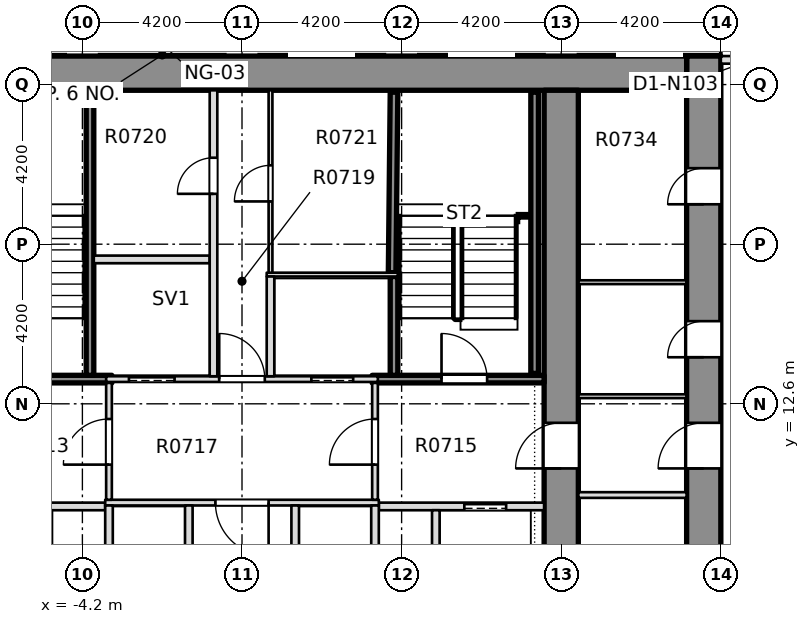
"""IFC4 building model, lengths in metres.
Left out: names, types, materials, properties, quantities, classifications, styles, units other than length and angle.
Written with IfcOpenShell. Run it as: python <this file> out.ifc"""

import sys

from ifc_helpers import new_model, si_unit, direction, frame, frame_2d, origin, place, context, subcontext, project, spatial, rectangle, extrude, element, fill, save


model = new_model("IFC4")
c1 = context("Model", 3, precision=1e-05, world=origin(), true_north=direction((0.0, 1.0)))
c2 = subcontext(c1, "Body", "Model", "MODEL_VIEW")
j1 = project(units=[si_unit("LENGTHUNIT", "METRE"), si_unit("PLANEANGLEUNIT", "RADIAN")], contexts=[c1])
p1 = place(None, origin())
s1 = spatial("IfcSite", under=j1, at=p1, CompositionType="ELEMENT")
p2 = place(p1, origin())
s2 = spatial("IfcBuilding", under=s1, at=p2, CompositionType="ELEMENT")
p3 = place(p2, frame((0.0, 0.0, 37.95)))
s3 = spatial("IfcBuildingStorey", under=s2, at=p3, CompositionType="ELEMENT", Elevation=37.95)
p4 = place(p3, frame((12.15, -8.4, -0.32), z_axis=(0.0, 0.0, 1.0), x_axis=(0.0, 1.0, 0.0)))
e1 = element("IfcWall", 1, at=p4, inside=s3, PredefinedType="SHEAR", context=c2, shape_type="SweptSolid", body=[
    extrude(rectangle(XDim=30.15, YDim=0.9, at=frame_2d((15.075, 0.0))), origin(), (0.0, 0.0, 1.0), 3.45),
])
p5 = place(p4, frame((3.925, 0.0, 0.32)))
e2 = element("IfcOpeningElement", 2, at=p5, cuts=e1, PredefinedType="OPENING", context=c2, shape_type="SweptSolid", body=[
    extrude(rectangle(XDim=0.95, YDim=2.1, at=frame_2d((0.475, 1.05))), frame((0.0, 0.46, 0.0), z_axis=(0.0, -1.0, 0.0), x_axis=(1.0, 0.0, 0.0)), (0.0, 0.0, 1.0), 0.92),
])
p6 = place(p4, frame((9.175, 0.0, 0.32)))
e3 = element("IfcOpeningElement", 3, at=p6, cuts=e1, PredefinedType="OPENING", context=c2, shape_type="SweptSolid", body=[
    extrude(rectangle(XDim=0.95, YDim=2.1, at=frame_2d((0.475, 1.05))), frame((0.0, 0.46, 0.0), z_axis=(0.0, -1.0, 0.0), x_axis=(1.0, 0.0, 0.0)), (0.0, 0.0, 1.0), 0.92),
])
p7 = place(p4, frame((14.525, 0.0, 0.32)))
e4 = element("IfcOpeningElement", 4, at=p7, cuts=e1, PredefinedType="OPENING", context=c2, shape_type="SweptSolid", body=[
    extrude(rectangle(XDim=0.95, YDim=2.1, at=frame_2d((0.475, 1.05))), frame((0.0, 0.46, 0.0), z_axis=(0.0, -1.0, 0.0), x_axis=(1.0, 0.0, 0.0)), (0.0, 0.0, 1.0), 0.92),
])
p8 = place(p4, frame((22.225, 0.0, 0.32)))
e5 = element("IfcOpeningElement", 5, at=p8, cuts=e1, PredefinedType="OPENING", context=c2, shape_type="SweptSolid", body=[
    extrude(rectangle(XDim=0.95, YDim=2.1, at=frame_2d((0.475, 1.05))), frame((0.0, 0.46, 0.0), z_axis=(0.0, -1.0, 0.0), x_axis=(1.0, 0.0, 0.0)), (0.0, 0.0, 1.0), 0.92),
])
p9 = place(p4, frame((26.25, 0.0, 0.32)))
e6 = element("IfcOpeningElement", 6, at=p9, cuts=e1, PredefinedType="OPENING", context=c2, shape_type="SweptSolid", body=[
    extrude(rectangle(XDim=0.95, YDim=2.1, at=frame_2d((0.475, 1.05))), frame((0.0, 0.46, 0.0), z_axis=(0.0, -1.0, 0.0), x_axis=(1.0, 0.0, 0.0)), (0.0, 0.0, 1.0), 0.92),
])
p10 = place(p4, frame((19.3, 0.0, 0.32)))
e7 = element("IfcOpeningElement", 7, at=p10, cuts=e1, PredefinedType="OPENING", context=c2, shape_type="SweptSolid", body=[
    extrude(rectangle(XDim=1.2, YDim=2.1, at=frame_2d((0.6, 1.05))), frame((0.0, 0.46, 0.0), z_axis=(0.0, -1.0, 0.0), x_axis=(1.0, 0.0, 0.0)), (0.0, 0.0, 1.0), 0.92),
])
p11 = place(p3, frame((-11.7, 21.3, -0.32), z_axis=(0.0, 0.0, 1.0), x_axis=(1.0, 0.0, 0.0)))
e8 = element("IfcWall", 8, at=p11, inside=s3, PredefinedType="SOLIDWALL", context=c2, shape_type="SweptSolid", body=[
    extrude(rectangle(XDim=23.4, YDim=0.9, at=frame_2d((11.7, 0.0))), origin(), (0.0, 0.0, 1.0), 3.45),
])
p12 = place(p3, frame((8.4, -7.5, -0.32), z_axis=(0.0, 0.0, 1.0), x_axis=(0.0, 1.0, 0.0)))
e9 = element("IfcWall", 9, at=p12, inside=s3, PredefinedType="SHEAR", context=c2, shape_type="SweptSolid", body=[
    extrude(rectangle(XDim=28.35, YDim=0.9, at=frame_2d((14.175, 0.0))), origin(), (0.0, 0.0, 1.0), 3.45),
])
p13 = place(p12, frame((18.4, 0.0, 0.32)))
e10 = element("IfcOpeningElement", 10, at=p13, cuts=e9, PredefinedType="OPENING", context=c2, shape_type="SweptSolid", body=[
    extrude(rectangle(XDim=1.2, YDim=2.1, at=frame_2d((0.6, 1.05))), frame((0.0, 0.46, 0.0), z_axis=(0.0, -1.0, 0.0), x_axis=(1.0, 0.0, 0.0)), (0.0, 0.0, 1.0), 0.92),
])
p14 = place(p3, frame((16.1, 21.65, 0.0), z_axis=(0.0, 0.0, 1.0), x_axis=(-1.0, 0.0, 0.0)))
e11 = element("IfcWall", 11, at=p14, inside=s3, PredefinedType="STANDARD", context=c2, shape_type="SweptSolid", body=[
    extrude(rectangle(XDim=3.5, YDim=0.2, at=frame_2d((1.75, 0.0))), origin(), (0.0, 0.0, 1.0), 3.13),
])
p15 = place(p14, frame((2.2, 0.0, 0.0)))
e12 = element("IfcOpeningElement", 12, at=p15, cuts=e11, PredefinedType="OPENING", context=c2, shape_type="SweptSolid", body=[
    extrude(rectangle(XDim=1.0, YDim=2.4, at=frame_2d((0.5, 1.2))), frame((0.0, 0.11, 0.0), z_axis=(0.0, -1.0, 0.0), x_axis=(1.0, 0.0, 0.0)), (0.0, 0.0, 1.0), 0.22),
])
p16 = place(p3, frame((-7.949, 9.9, 0.0), z_axis=(0.0, 0.0, 1.0), x_axis=(1.0, 0.0, 0.0)))
e13 = element("IfcWall", 13, at=p16, inside=s3, PredefinedType="PARTITIONING", context=c2, shape_type="SweptSolid", body=[
    extrude(rectangle(XDim=4.349, YDim=0.2, at=frame_2d((2.174, 0.0))), origin(), (0.0, 0.0, 1.0), 3.13),
])
p17 = place(p16, frame((0.999, 0.0, 0.0)))
e14 = element("IfcOpeningElement", 14, at=p17, cuts=e13, PredefinedType="OPENING", context=c2, shape_type="SweptSolid", body=[
    extrude(rectangle(XDim=1.1, YDim=2.1, at=frame_2d((0.55, 1.05))), frame((0.0, 0.11, 0.0), z_axis=(0.0, -1.0, 0.0), x_axis=(1.0, 0.0, 0.0)), (0.0, 0.0, 1.0), 0.22),
])
p18 = place(p3, frame((3.6, 9.9, 0.0), z_axis=(0.0, 0.0, 1.0), x_axis=(1.0, 0.0, 0.0)))
e15 = element("IfcWall", 15, at=p18, inside=s3, PredefinedType="PARTITIONING", context=c2, shape_type="SweptSolid", body=[
    extrude(rectangle(XDim=4.349, YDim=0.2, at=frame_2d((2.174, 0.0))), origin(), (0.0, 0.0, 1.0), 3.13),
])
p19 = place(p18, frame((2.25, 0.0, 0.0)))
e16 = element("IfcOpeningElement", 16, at=p19, cuts=e15, PredefinedType="OPENING", context=c2, shape_type="SweptSolid", body=[
    extrude(rectangle(XDim=1.1, YDim=2.1, at=frame_2d((0.55, 1.05))), frame((0.0, 0.11, 0.0), z_axis=(0.0, -1.0, 0.0), x_axis=(1.0, 0.0, 0.0)), (0.0, 0.0, 1.0), 0.22),
])
p20 = place(p3, frame((-3.6, 10.0, 0.0), z_axis=(0.0, 0.0, 1.0), x_axis=(1.0, 0.0, 0.0)))
e17 = element("IfcWall", 17, at=p20, inside=s3, PredefinedType="PARTITIONING", context=c2, shape_type="SweptSolid", body=[
    extrude(rectangle(XDim=7.2, YDim=0.15, at=frame_2d((3.6, 0.0))), origin(), (0.0, 0.0, 1.0), 3.13),
])
p21 = place(p20, frame((2.9, 0.0, 0.0)))
e18 = element("IfcOpeningElement", 18, at=p21, cuts=e17, PredefinedType="OPENING", context=c2, shape_type="SweptSolid", body=[
    extrude(rectangle(XDim=1.4, YDim=2.1, at=frame_2d((0.7, 1.05))), frame((0.0, 0.085, 0.0), z_axis=(0.0, -1.0, 0.0), x_axis=(1.0, 0.0, 0.0)), (0.0, 0.0, 1.0), 0.17),
])
p22 = place(p3, frame((-7.949, 13.25, 0.0), z_axis=(0.0, 0.0, 1.0), x_axis=(1.0, 0.0, 0.0)))
e19 = element("IfcWall", 19, at=p22, inside=s3, PredefinedType="SOLIDWALL", context=c2, shape_type="SweptSolid", body=[
    extrude(rectangle(XDim=4.524, YDim=0.2, at=frame_2d((2.262, 0.0))), origin(), (0.0, 0.0, 1.0), 3.13),
])
p23 = place(p22, frame((1.499, 0.0, 0.0)))
e20 = element("IfcOpeningElement", 20, at=p23, cuts=e19, PredefinedType="OPENING", context=c2, shape_type="SweptSolid", body=[
    extrude(rectangle(XDim=1.2, YDim=2.1, at=frame_2d((0.6, 1.05))), frame((0.0, 0.11, 0.0), z_axis=(0.0, -1.0, 0.0), x_axis=(1.0, 0.0, 0.0)), (0.0, 0.0, 1.0), 0.22),
])
p24 = place(p3, frame((-3.575, 13.25, 0.0), z_axis=(0.0, 0.0, 1.0), x_axis=(1.0, 0.0, 0.0)))
e21 = element("IfcWall", 21, at=p24, inside=s3, PredefinedType="PARTITIONING", context=c2, shape_type="SweptSolid", body=[
    extrude(rectangle(XDim=7.15, YDim=0.15, at=frame_2d((3.575, 0.0))), origin(), (0.0, 0.0, 1.0), 3.13),
])
p25 = place(p24, frame((0.6, 0.0, 0.0)))
e22 = element("IfcOpeningElement", 22, at=p25, cuts=e21, PredefinedType="OPENING", context=c2, shape_type="SweptSolid", body=[
    extrude(rectangle(XDim=1.2, YDim=2.1, at=frame_2d((0.6, 1.05))), frame((0.0, 0.085, 0.0), z_axis=(0.0, -1.0, 0.0), x_axis=(1.0, 0.0, 0.0)), (0.0, 0.0, 1.0), 0.17),
])
p26 = place(p24, frame((5.4, 0.0, 0.0)))
e23 = element("IfcOpeningElement", 23, at=p26, cuts=e21, PredefinedType="OPENING", context=c2, shape_type="SweptSolid", body=[
    extrude(rectangle(XDim=1.1, YDim=2.1, at=frame_2d((0.55, 1.05))), frame((0.0, 0.085, 0.0), z_axis=(0.0, -1.0, 0.0), x_axis=(1.0, 0.0, 0.0)), (0.0, 0.0, 1.0), 0.17),
])
p27 = place(p24, frame((2.975, 0.0, 0.0)))
e24 = element("IfcOpeningElement", 24, at=p27, cuts=e21, PredefinedType="OPENING", context=c2, shape_type="SweptSolid", body=[
    extrude(rectangle(XDim=1.2, YDim=2.1, at=frame_2d((0.6, 1.05))), frame((0.0, 0.085, 0.0), z_axis=(0.0, -1.0, 0.0), x_axis=(1.0, 0.0, 0.0)), (0.0, 0.0, 1.0), 0.17),
])
p28 = place(p3, frame((3.425, 13.25, 0.0), z_axis=(0.0, 0.0, 1.0), x_axis=(1.0, 0.0, 0.0)))
e25 = element("IfcWall", 25, at=p28, inside=s3, PredefinedType="SOLIDWALL", context=c2, shape_type="SweptSolid", body=[
    extrude(rectangle(XDim=4.524, YDim=0.2, at=frame_2d((2.262, 0.0))), origin(), (0.0, 0.0, 1.0), 3.13),
])
p29 = place(p28, frame((1.825, 0.0, 0.0)))
e26 = element("IfcOpeningElement", 26, at=p29, cuts=e25, PredefinedType="OPENING", context=c2, shape_type="SweptSolid", body=[
    extrude(rectangle(XDim=1.2, YDim=2.1, at=frame_2d((0.6, 1.05))), frame((0.0, 0.11, 0.0), z_axis=(0.0, -1.0, 0.0), x_axis=(1.0, 0.0, 0.0)), (0.0, 0.0, 1.0), 0.22),
])
p30 = place(p3, frame((0.65, 16.0, 0.0), z_axis=(0.0, 0.0, 1.0), x_axis=(1.0, 0.0, 0.0)))
e27 = element("IfcWall", 27, at=p30, inside=s3, PredefinedType="PARTITIONING", context=c2, shape_type="SweptSolid", body=[
    extrude(rectangle(XDim=3.45, YDim=0.1, at=frame_2d((1.725, 0.0))), origin(), (0.0, 0.0, 1.0), 3.13),
])
p31 = place(p3, frame((-3.9, 16.4, 0.0), z_axis=(0.0, 0.0, 1.0), x_axis=(1.0, 0.0, 0.0)))
e28 = element("IfcWall", 28, at=p31, inside=s3, PredefinedType="PARTITIONING", context=c2, shape_type="SweptSolid", body=[
    extrude(rectangle(XDim=3.05, YDim=0.2, at=frame_2d((1.525, 0.0))), origin(), (0.0, 0.0, 1.0), 3.13),
])
p32 = place(p3, frame((-4.0, 13.35, 0.0), z_axis=(0.0, 0.0, 1.0), x_axis=(0.0, 1.0, 0.0)))
e29 = element("IfcWall", 29, at=p32, inside=s3, PredefinedType="SOLIDWALL", context=c2, shape_type="SweptSolid", body=[
    extrude(rectangle(XDim=7.499, YDim=0.2, at=frame_2d((3.75, 0.0))), origin(), (0.0, 0.0, 1.0), 3.13),
])
p33 = place(p3, frame((-3.5, 7.075, 0.0), z_axis=(0.0, 0.0, 1.0), x_axis=(0.0, 1.0, 0.0)))
e30 = element("IfcWall", 30, at=p33, inside=s3, PredefinedType="PARTITIONING", context=c2, shape_type="SweptSolid", body=[
    extrude(rectangle(XDim=2.85, YDim=0.2, at=frame_2d((1.425, 0.0))), origin(), (0.0, 0.0, 1.0), 3.13),
])
p34 = place(p3, frame((-3.5, 10.075, 0.0), z_axis=(0.0, 0.0, 1.0), x_axis=(0.0, 1.0, 0.0)))
e31 = element("IfcWall", 31, at=p34, inside=s3, PredefinedType="PARTITIONING", context=c2, shape_type="SweptSolid", body=[
    extrude(rectangle(XDim=3.075, YDim=0.15, at=frame_2d((1.538, 0.0))), origin(), (0.0, 0.0, 1.0), 3.13),
])
p35 = place(p34, frame((0.925, 0.0, 0.0)))
e32 = element("IfcOpeningElement", 32, at=p35, cuts=e31, PredefinedType="OPENING", context=c2, shape_type="SweptSolid", body=[
    extrude(rectangle(XDim=1.2, YDim=2.1, at=frame_2d((0.6, 1.05))), frame((0.0, 0.085, 0.0), z_axis=(0.0, -1.0, 0.0), x_axis=(1.0, 0.0, 0.0)), (0.0, 0.0, 1.0), 0.17),
])
p36 = place(p3, frame((-1.4, 7.075, 0.0), z_axis=(0.0, 0.0, 1.0), x_axis=(0.0, 1.0, 0.0)))
e33 = element("IfcWall", 33, at=p36, inside=s3, PredefinedType="PARTITIONING", context=c2, shape_type="SweptSolid", body=[
    extrude(rectangle(XDim=2.85, YDim=0.2, at=frame_2d((1.425, 0.0))), origin(), (0.0, 0.0, 1.0), 3.13),
])
p37 = place(p3, frame((-0.75, 13.325, 0.0), z_axis=(0.0, 0.0, 1.0), x_axis=(0.0, 1.0, 0.0)))
e34 = element("IfcWall", 34, at=p37, inside=s3, PredefinedType="PARTITIONING", context=c2, shape_type="SweptSolid", body=[
    extrude(rectangle(XDim=7.524, YDim=0.2, at=frame_2d((3.762, 0.0))), origin(), (0.0, 0.0, 1.0), 3.13),
])
p38 = place(p37, frame((4.8, 0.0, 0.0)))
e35 = element("IfcOpeningElement", 35, at=p38, cuts=e34, PredefinedType="OPENING", context=c2, shape_type="SweptSolid", body=[
    extrude(rectangle(XDim=0.95, YDim=2.1, at=frame_2d((0.475, 1.05))), frame((0.0, 0.11, 0.0), z_axis=(0.0, -1.0, 0.0), x_axis=(1.0, 0.0, 0.0)), (0.0, 0.0, 1.0), 0.22),
])
p39 = place(p3, frame((0.75, 13.325, 0.0), z_axis=(0.0, 0.0, 1.0), x_axis=(0.0, 1.0, 0.0)))
e36 = element("IfcWall", 36, at=p39, inside=s3, PredefinedType="PARTITIONING", context=c2, shape_type="SweptSolid", body=[
    extrude(rectangle(XDim=2.625, YDim=0.2, at=frame_2d((1.312, 0.0))), origin(), (0.0, 0.0, 1.0), 3.13),
])
p40 = place(p3, frame((0.75, 16.05, 0.0), z_axis=(0.0, 0.0, 1.0), x_axis=(0.0, 1.0, 0.0)))
e37 = element("IfcWall", 37, at=p40, inside=s3, PredefinedType="PARTITIONING", context=c2, shape_type="SweptSolid", body=[
    extrude(rectangle(XDim=4.799, YDim=0.1, at=frame_2d((2.399, 0.0))), origin(), (0.0, 0.0, 1.0), 3.13),
])
p41 = place(p40, frame((1.875, 0.0, 0.0)))
e38 = element("IfcOpeningElement", 38, at=p41, cuts=e37, PredefinedType="OPENING", context=c2, shape_type="SweptSolid", body=[
    extrude(rectangle(XDim=0.95, YDim=2.1, at=frame_2d((0.475, 1.05))), frame((0.0, 0.06, 0.0), z_axis=(0.0, -1.0, 0.0), x_axis=(1.0, 0.0, 0.0)), (0.0, 0.0, 1.0), 0.12),
])
for number, where, z_axis, x_axis in (
    (39, (1.4, 7.075, 0.0), (0.0, 0.0, 1.0), (0.0, 1.0, 0.0)),
    (40, (3.5, 7.075, 0.0), (0.0, 0.0, 1.0), (0.0, 1.0, 0.0)),
):
    element("IfcWall", number, at=place(p3, frame(where, z_axis=z_axis, x_axis=x_axis)), inside=s3, PredefinedType="PARTITIONING", context=c2, shape_type="SweptSolid", body=[
        extrude(rectangle(XDim=2.85, YDim=0.2, at=frame_2d((1.425, 0.0))), origin(), (0.0, 0.0, 1.0), 3.13),
    ])
p42 = place(p3, frame((3.5, 10.075, 0.0), z_axis=(0.0, 0.0, 1.0), x_axis=(0.0, 1.0, 0.0)))
e41 = element("IfcWall", 41, at=p42, inside=s3, PredefinedType="PARTITIONING", context=c2, shape_type="SweptSolid", body=[
    extrude(rectangle(XDim=3.075, YDim=0.15, at=frame_2d((1.538, 0.0))), origin(), (0.0, 0.0, 1.0), 3.13),
])
p43 = place(p42, frame((0.925, 0.0, 0.0)))
e42 = element("IfcOpeningElement", 42, at=p43, cuts=e41, PredefinedType="OPENING", context=c2, shape_type="SweptSolid", body=[
    extrude(rectangle(XDim=1.2, YDim=2.1, at=frame_2d((0.6, 1.05))), frame((0.0, 0.085, 0.0), z_axis=(0.0, -1.0, 0.0), x_axis=(1.0, 0.0, 0.0)), (0.0, 0.0, 1.0), 0.17),
])
p44 = place(p3, frame((4.0, 13.35, 0.0), z_axis=(0.0, 0.0, 1.0), x_axis=(0.0, 1.0, 0.0)))
e43 = element("IfcWall", 43, at=p44, inside=s3, PredefinedType="SOLIDWALL", context=c2, shape_type="SweptSolid", body=[
    extrude(rectangle(XDim=2.6, YDim=0.2, at=frame_2d((1.3, 0.0))), origin(), (0.0, 0.0, 1.0), 3.13),
])
p45 = place(p3, frame((3.95, 16.05, 0.0), z_axis=(0.0, 0.0, 1.0), x_axis=(0.010538176883, 0.999944471872, 0.0)))
e44 = element("IfcWall", 44, at=p45, inside=s3, PredefinedType="SOLIDWALL", context=c2, shape_type="SweptSolid", body=[
    extrude(rectangle(XDim=4.749, YDim=0.2, at=frame_2d((2.375, 0.0))), origin(), (0.0, 0.0, 1.0), 3.13),
])
p46 = place(p3, frame((5.1, 7.075, 0.0), z_axis=(0.0, 0.0, 1.0), x_axis=(0.0, 1.0, 0.0)))
e45 = element("IfcWall", 45, at=p46, inside=s3, PredefinedType="PARTITIONING", context=c2, shape_type="SweptSolid", body=[
    extrude(rectangle(XDim=2.725, YDim=0.2, at=frame_2d((1.363, 0.0))), origin(), (0.0, 0.0, 1.0), 3.13),
])
p47 = place(p3, frame((8.851, 10.2, 0.0), z_axis=(0.0, 0.0, 1.0), x_axis=(1.0, 0.0, 0.0)))
e46 = element("IfcWall", 46, at=p47, inside=s3, PredefinedType="PARTITIONING", context=c2, shape_type="SweptSolid", body=[
    extrude(rectangle(XDim=2.848, YDim=0.15, at=frame_2d((1.424, 0.0))), origin(), (0.0, 0.0, 1.0), 3.13),
])
for number, where, z_axis, x_axis in (
    (47, (8.851, 12.8, 0.0), (0.0, 0.0, 1.0), (1.0, 0.0, 0.0)),
    (48, (8.851, 15.8, 0.0), (0.0, 0.0, 1.0), (1.0, 0.0, 0.0)),
):
    element("IfcWall", number, at=place(p3, frame(where, z_axis=z_axis, x_axis=x_axis)), inside=s3, PredefinedType="PARTITIONING", context=c2, shape_type="SweptSolid", body=[
        extrude(rectangle(XDim=2.848, YDim=0.1, at=frame_2d((1.424, 0.0))), origin(), (0.0, 0.0, 1.0), 3.13),
    ])
p48 = place(p3, frame((7.7, 13.4, 0.0), z_axis=(0.0, 0.0, 1.0), x_axis=(0.0, 1.0, 0.0)))
e49 = element("IfcWall", 49, at=p48, inside=s3, PredefinedType="SOLIDWALL", context=c2, shape_type="SweptSolid", body=[
    extrude(rectangle(XDim=7.4, YDim=0.2, at=frame_2d((3.7, 0.0))), origin(), (0.0, 0.0, 1.0), 3.13),
])
p49 = place(p29, origin())
e50 = element("IfcDoor", 50, at=p49, inside=s3, OperationType="SINGLE_SWING_RIGHT", PredefinedType="DOOR", context=c2, shape_type="SweptSolid", body=[
    extrude(rectangle(XDim=1.2, YDim=2.1, at=frame_2d((0.6, 1.05))), frame((0.0, 0.025, 0.0), z_axis=(0.0, -1.0, 0.0), x_axis=(1.0, 0.0, 0.0)), (0.0, 0.0, 1.0), 0.05),
])
fill(e26, e50)
p50 = place(p19, origin())
e51 = element("IfcDoor", 51, at=p50, inside=s3, OperationType="SLIDING_TO_LEFT", PredefinedType="DOOR", context=c2, shape_type="SweptSolid", body=[
    extrude(rectangle(XDim=1.1, YDim=2.1, at=frame_2d((0.55, 1.05))), frame((0.0, 0.025, 0.0), z_axis=(0.0, -1.0, 0.0), x_axis=(1.0, 0.0, 0.0)), (0.0, 0.0, 1.0), 0.05),
])
fill(e16, e51)
p51 = place(p21, origin())
e52 = element("IfcDoor", 52, at=p51, inside=s3, OperationType="SINGLE_SWING_RIGHT", PredefinedType="DOOR", context=c2, shape_type="SweptSolid", body=[
    extrude(rectangle(XDim=1.4, YDim=2.1, at=frame_2d((0.7, 1.05))), frame((0.0, 0.025, 0.0), z_axis=(0.0, -1.0, 0.0), x_axis=(1.0, 0.0, 0.0)), (0.0, 0.0, 1.0), 0.05),
])
fill(e18, e52)
p52 = place(p25, origin())
e53 = element("IfcDoor", 53, at=p52, inside=s3, OperationType="SLIDING_TO_RIGHT", PredefinedType="DOOR", context=c2, shape_type="SweptSolid", body=[
    extrude(rectangle(XDim=1.2, YDim=2.1, at=frame_2d((0.6, 1.05))), frame((0.0, 0.025, 0.0), z_axis=(0.0, -1.0, 0.0), x_axis=(1.0, 0.0, 0.0)), (0.0, 0.0, 1.0), 0.05),
])
fill(e22, e53)
p53 = place(p26, origin())
e54 = element("IfcDoor", 54, at=p53, inside=s3, OperationType="SLIDING_TO_LEFT", PredefinedType="DOOR", context=c2, shape_type="SweptSolid", body=[
    extrude(rectangle(XDim=1.1, YDim=2.1, at=frame_2d((0.55, 1.05))), frame((0.0, 0.025, 0.0), z_axis=(0.0, -1.0, 0.0), x_axis=(1.0, 0.0, 0.0)), (0.0, 0.0, 1.0), 0.05),
])
fill(e23, e54)
p54 = place(p27, origin())
e55 = element("IfcDoor", 55, at=p54, inside=s3, OperationType="SINGLE_SWING_RIGHT", PredefinedType="DOOR", context=c2, shape_type="SweptSolid", body=[
    extrude(rectangle(XDim=1.2, YDim=2.1, at=frame_2d((0.6, 1.05))), frame((0.0, 0.025, 0.0), z_axis=(0.0, -1.0, 0.0), x_axis=(1.0, 0.0, 0.0)), (0.0, 0.0, 1.0), 0.05),
])
fill(e24, e55)
p55 = place(p38, origin())
e56 = element("IfcDoor", 56, at=p55, inside=s3, OperationType="SINGLE_SWING_RIGHT", PredefinedType="DOOR", context=c2, shape_type="SweptSolid", body=[
    extrude(rectangle(XDim=0.95, YDim=2.1, at=frame_2d((0.475, 1.05))), frame((0.0, 0.025, 0.0), z_axis=(0.0, -1.0, 0.0), x_axis=(1.0, 0.0, 0.0)), (0.0, 0.0, 1.0), 0.05),
])
fill(e35, e56)
p56 = place(p41, origin())
e57 = element("IfcDoor", 57, at=p56, inside=s3, OperationType="SINGLE_SWING_LEFT", PredefinedType="DOOR", context=c2, shape_type="SweptSolid", body=[
    extrude(rectangle(XDim=0.95, YDim=2.1, at=frame_2d((0.475, 1.05))), frame((0.0, 0.025, 0.0), z_axis=(0.0, -1.0, 0.0), x_axis=(1.0, 0.0, 0.0)), (0.0, 0.0, 1.0), 0.05),
])
fill(e38, e57)
p57 = place(p35, origin())
e58 = element("IfcDoor", 58, at=p57, inside=s3, OperationType="SINGLE_SWING_RIGHT", PredefinedType="DOOR", context=c2, shape_type="SweptSolid", body=[
    extrude(rectangle(XDim=1.2, YDim=2.1, at=frame_2d((0.6, 1.05))), frame((0.0, 0.025, 0.0), z_axis=(0.0, -1.0, 0.0), x_axis=(1.0, 0.0, 0.0)), (0.0, 0.0, 1.0), 0.05),
])
fill(e32, e58)
p58 = place(p43, origin())
e59 = element("IfcDoor", 59, at=p58, inside=s3, OperationType="SINGLE_SWING_LEFT", PredefinedType="DOOR", context=c2, shape_type="SweptSolid", body=[
    extrude(rectangle(XDim=1.2, YDim=2.1, at=frame_2d((0.6, 1.05))), frame((0.0, 0.025, 0.0), z_axis=(0.0, -1.0, 0.0), x_axis=(1.0, 0.0, 0.0)), (0.0, 0.0, 1.0), 0.05),
])
fill(e42, e59)
p59 = place(p8, origin())
e60 = element("IfcDoor", 60, at=p59, inside=s3, OperationType="SINGLE_SWING_LEFT", PredefinedType="DOOR", context=c2, shape_type="SweptSolid", body=[
    extrude(rectangle(XDim=0.95, YDim=2.1, at=frame_2d((0.475, 1.05))), frame((0.0, 0.025, 0.0), z_axis=(0.0, -1.0, 0.0), x_axis=(1.0, 0.0, 0.0)), (0.0, 0.0, 1.0), 0.05),
])
fill(e5, e60)
p60 = place(p9, origin())
e61 = element("IfcDoor", 61, at=p60, inside=s3, OperationType="SINGLE_SWING_LEFT", PredefinedType="DOOR", context=c2, shape_type="SweptSolid", body=[
    extrude(rectangle(XDim=0.95, YDim=2.1, at=frame_2d((0.475, 1.05))), frame((0.0, 0.025, 0.0), z_axis=(0.0, -1.0, 0.0), x_axis=(1.0, 0.0, 0.0)), (0.0, 0.0, 1.0), 0.05),
])
fill(e6, e61)
p61 = place(p10, origin())
e62 = element("IfcDoor", 62, at=p61, inside=s3, OperationType="SINGLE_SWING_LEFT", PredefinedType="DOOR", context=c2, shape_type="SweptSolid", body=[
    extrude(rectangle(XDim=1.2, YDim=2.1, at=frame_2d((0.6, 1.05))), frame((0.0, 0.025, 0.0), z_axis=(0.0, -1.0, 0.0), x_axis=(1.0, 0.0, 0.0)), (0.0, 0.0, 1.0), 0.05),
])
fill(e7, e62)
p62 = place(p13, origin())
e63 = element("IfcDoor", 63, at=p62, inside=s3, OperationType="SINGLE_SWING_LEFT", PredefinedType="DOOR", context=c2, shape_type="SweptSolid", body=[
    extrude(rectangle(XDim=1.2, YDim=2.1, at=frame_2d((0.6, 1.05))), frame((0.0, 0.025, 0.0), z_axis=(0.0, -1.0, 0.0), x_axis=(1.0, 0.0, 0.0)), (0.0, 0.0, 1.0), 0.05),
])
fill(e10, e63)
save(model, sys.argv[1])
